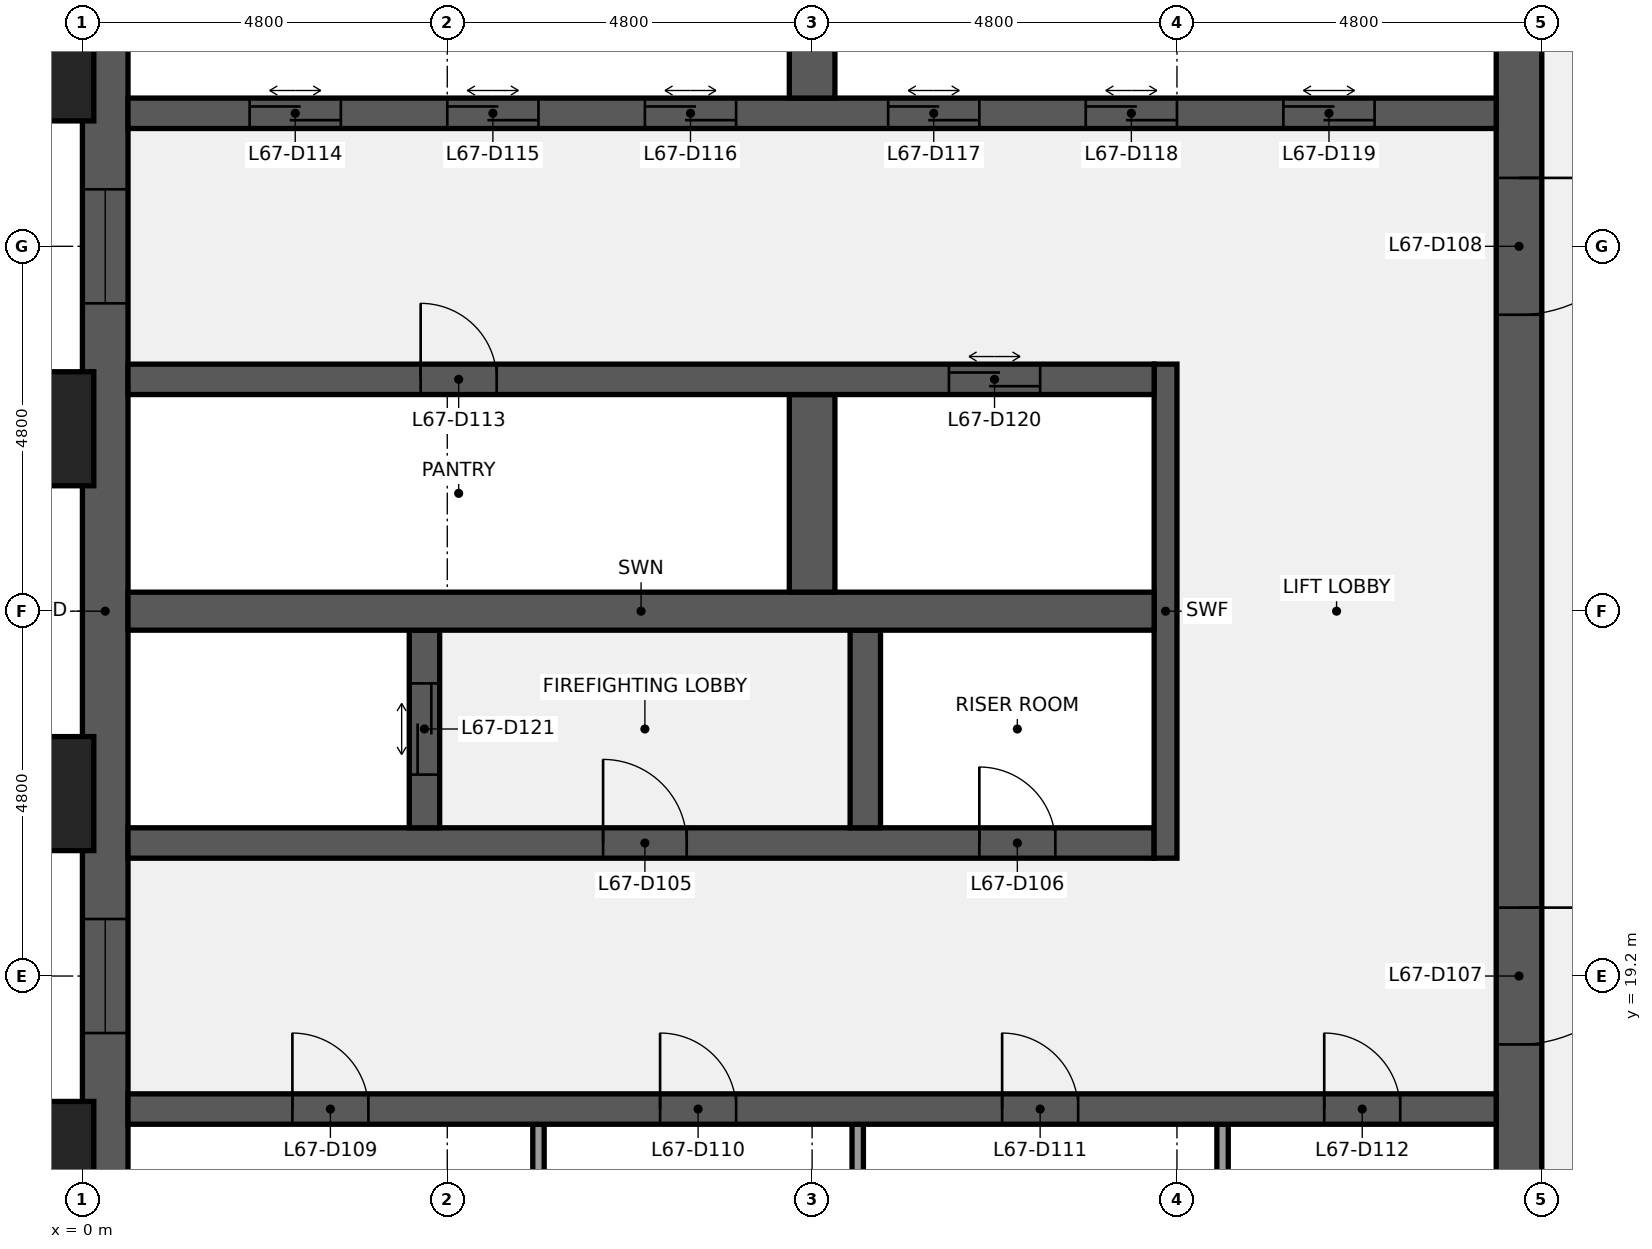
"""IFC4 building model, lengths in metres.
Left out: names, types, materials, properties, quantities, classifications, styles, units other than length and angle.
Written with IfcOpenShell. Run it as: python <this file> out.ifc"""

import sys

from ifc_helpers import new_model, si_unit, direction, frame, frame_2d, origin, origin_2d, place, context, subcontext, project, spatial, rectangle, extrude, element, fill, save


model = new_model("IFC4")
c1 = context("Model", 3, precision=1e-05, world=origin(), true_north=direction((0.0, 1.0)))
c2 = subcontext(c1, "Body", "Model", "MODEL_VIEW")
j1 = project(units=[si_unit("LENGTHUNIT", "METRE"), si_unit("PLANEANGLEUNIT", "RADIAN")], contexts=[c1])
p1 = place(None, origin())
s1 = spatial("IfcSite", under=j1, at=p1, CompositionType="ELEMENT")
p2 = place(p1, origin())
s2 = spatial("IfcBuilding", under=s1, at=p2, CompositionType="ELEMENT")
p3 = place(p2, frame((0.0, 0.0, 306.3)))
s3 = spatial("IfcBuildingStorey", under=s2, at=p3, CompositionType="ELEMENT", Elevation=306.3)
p4 = place(p3, frame((0.3, 9.6, 0.0), z_axis=(0.0, 0.0, 1.0), x_axis=(0.0, 1.0, 0.0)))
e1 = element("IfcWall", 1, at=p4, inside=s3, PredefinedType="SHEAR", context=c2, shape_type="SweptSolid", body=[
    extrude(rectangle(XDim=28.8, YDim=0.6, at=frame_2d((14.4, 0.0))), origin(), (0.0, 0.0, 1.0), 3.84),
])
p5 = place(p4, frame((8.85, 0.0, 0.9)))
e2 = element("IfcOpeningElement", 2, at=p5, cuts=e1, PredefinedType="OPENING", context=c2, shape_type="SweptSolid", body=[
    extrude(rectangle(XDim=1.5, YDim=1.5, at=frame_2d((0.75, 0.75))), frame((0.0, 0.31, 0.0), z_axis=(0.0, -1.0, 0.0), x_axis=(1.0, 0.0, 0.0)), (0.0, 0.0, 1.0), 0.62),
])
p6 = place(p4, frame((18.45, 0.0, 0.9)))
e3 = element("IfcOpeningElement", 3, at=p6, cuts=e1, PredefinedType="OPENING", context=c2, shape_type="SweptSolid", body=[
    extrude(rectangle(XDim=1.5, YDim=1.5, at=frame_2d((0.75, 0.75))), frame((0.0, 0.31, 0.0), z_axis=(0.0, -1.0, 0.0), x_axis=(1.0, 0.0, 0.0)), (0.0, 0.0, 1.0), 0.62),
])
p7 = place(p3, frame((18.9, 38.4, 0.0), z_axis=(0.0, 0.0, 1.0), x_axis=(0.0, -1.0, 0.0)))
e4 = element("IfcWall", 4, at=p7, inside=s3, PredefinedType="SHEAR", context=c2, shape_type="SweptSolid", body=[
    extrude(rectangle(XDim=28.8, YDim=0.6, at=frame_2d((14.4, 0.0))), origin(), (0.0, 0.0, 1.0), 3.84),
])
p8 = place(p7, frame((18.3, 0.0, 0.0)))
e5 = element("IfcOpeningElement", 5, at=p8, cuts=e4, PredefinedType="OPENING", context=c2, shape_type="SweptSolid", body=[
    extrude(rectangle(XDim=1.8, YDim=2.1, at=frame_2d((0.9, 1.05))), frame((0.0, 0.31, 0.0), z_axis=(0.0, -1.0, 0.0), x_axis=(1.0, 0.0, 0.0)), (0.0, 0.0, 1.0), 0.62),
])
p9 = place(p7, frame((8.7, 0.0, 0.0)))
e6 = element("IfcOpeningElement", 6, at=p9, cuts=e4, PredefinedType="OPENING", context=c2, shape_type="SweptSolid", body=[
    extrude(rectangle(XDim=1.8, YDim=2.1, at=frame_2d((0.9, 1.05))), frame((0.0, 0.31, 0.0), z_axis=(0.0, -1.0, 0.0), x_axis=(1.0, 0.0, 0.0)), (0.0, 0.0, 1.0), 0.62),
])
for number, where, z_axis, x_axis in (
    (7, (6.0, 14.65, 0.0), (0.0, 0.0, 1.0), (0.0, 1.0, 0.0)),
    (8, (10.2, 14.65, 0.0), (0.0, 0.0, 1.0), (0.0, 1.0, 0.0)),
    (9, (15.0, 14.65, 0.0), (0.0, 0.0, 1.0), (0.0, 1.0, 0.0)),
):
    element("IfcWall", number, at=place(p3, frame(where, z_axis=z_axis, x_axis=x_axis)), inside=s3, PredefinedType="PARTITIONING", context=c2, shape_type="SweptSolid", body=[
        extrude(rectangle(XDim=2.6, YDim=0.15, at=frame_2d((1.3, 0.0))), origin(), (0.0, 0.0, 1.0), 3.84),
    ])
p10 = place(p3, frame((0.6, 17.45, 0.0), z_axis=(0.0, 0.0, 1.0), x_axis=(1.0, 0.0, 0.0)))
e10 = element("IfcWall", 10, at=p10, inside=s3, PredefinedType="SHEAR", context=c2, shape_type="SweptSolid", body=[
    extrude(rectangle(XDim=18.0, YDim=0.4, at=frame_2d((9.0, 0.0))), origin(), (0.0, 0.0, 1.0), 3.84),
])
p11 = place(p10, frame((2.163, 0.0, 0.0)))
e11 = element("IfcOpeningElement", 11, at=p11, cuts=e10, PredefinedType="OPENING", context=c2, shape_type="SweptSolid", body=[
    extrude(rectangle(XDim=1.0, YDim=2.1, at=frame_2d((0.5, 1.05))), frame((0.0, 0.21, 0.0), z_axis=(0.0, -1.0, 0.0), x_axis=(1.0, 0.0, 0.0)), (0.0, 0.0, 1.0), 0.42),
])
p12 = place(p10, frame((7.0, 0.0, 0.0)))
e12 = element("IfcOpeningElement", 12, at=p12, cuts=e10, PredefinedType="OPENING", context=c2, shape_type="SweptSolid", body=[
    extrude(rectangle(XDim=1.0, YDim=2.1, at=frame_2d((0.5, 1.05))), frame((0.0, 0.21, 0.0), z_axis=(0.0, -1.0, 0.0), x_axis=(1.0, 0.0, 0.0)), (0.0, 0.0, 1.0), 0.42),
])
p13 = place(p10, frame((11.5, 0.0, 0.0)))
e13 = element("IfcOpeningElement", 13, at=p13, cuts=e10, PredefinedType="OPENING", context=c2, shape_type="SweptSolid", body=[
    extrude(rectangle(XDim=1.0, YDim=2.1, at=frame_2d((0.5, 1.05))), frame((0.0, 0.21, 0.0), z_axis=(0.0, -1.0, 0.0), x_axis=(1.0, 0.0, 0.0)), (0.0, 0.0, 1.0), 0.42),
])
p14 = place(p10, frame((15.738, 0.0, 0.0)))
e14 = element("IfcOpeningElement", 14, at=p14, cuts=e10, PredefinedType="OPENING", context=c2, shape_type="SweptSolid", body=[
    extrude(rectangle(XDim=1.0, YDim=2.1, at=frame_2d((0.5, 1.05))), frame((0.0, 0.21, 0.0), z_axis=(0.0, -1.0, 0.0), x_axis=(1.0, 0.0, 0.0)), (0.0, 0.0, 1.0), 0.42),
])
p15 = place(p3, frame((0.6, 20.95, 0.0), z_axis=(0.0, 0.0, 1.0), x_axis=(1.0, 0.0, 0.0)))
e15 = element("IfcWall", 15, at=p15, inside=s3, PredefinedType="SHEAR", context=c2, shape_type="SweptSolid", body=[
    extrude(rectangle(XDim=13.5, YDim=0.4, at=frame_2d((6.75, 0.0))), origin(), (0.0, 0.0, 1.0), 3.84),
])
p16 = place(p15, frame((6.25, 0.0, 0.0)))
e16 = element("IfcOpeningElement", 16, at=p16, cuts=e15, PredefinedType="OPENING", context=c2, shape_type="SweptSolid", body=[
    extrude(rectangle(XDim=1.1, YDim=2.1, at=frame_2d((0.55, 1.05))), frame((0.0, 0.21, 0.0), z_axis=(0.0, -1.0, 0.0), x_axis=(1.0, 0.0, 0.0)), (0.0, 0.0, 1.0), 0.42),
])
p17 = place(p15, frame((11.2, 0.0, 0.0)))
e17 = element("IfcOpeningElement", 17, at=p17, cuts=e15, PredefinedType="OPENING", context=c2, shape_type="SweptSolid", body=[
    extrude(rectangle(XDim=1.0, YDim=2.1, at=frame_2d((0.5, 1.05))), frame((0.0, 0.21, 0.0), z_axis=(0.0, -1.0, 0.0), x_axis=(1.0, 0.0, 0.0)), (0.0, 0.0, 1.0), 0.42),
])
p18 = place(p3, frame((14.25, 20.75, 0.0), z_axis=(0.0, 0.0, 1.0), x_axis=(0.0, 1.0, 0.0)))
e18 = element("IfcWall", 18, at=p18, inside=s3, PredefinedType="SHEAR", context=c2, shape_type="SweptSolid", body=[
    extrude(rectangle(XDim=6.5, YDim=0.3, at=frame_2d((3.25, 0.0))), origin(), (0.0, 0.0, 1.0), 3.84),
])
p19 = place(p3, frame((4.5, 21.15, 0.0), z_axis=(0.0, 0.0, 1.0), x_axis=(0.0, 1.0, 0.0)))
e19 = element("IfcWall", 19, at=p19, inside=s3, PredefinedType="SHEAR", context=c2, shape_type="SweptSolid", body=[
    extrude(rectangle(XDim=2.6, YDim=0.4, at=frame_2d((1.3, 0.0))), origin(), (0.0, 0.0, 1.0), 3.84),
])
p20 = place(p19, frame((0.7, 0.0, 0.0)))
e20 = element("IfcOpeningElement", 20, at=p20, cuts=e19, PredefinedType="OPENING", context=c2, shape_type="SweptSolid", body=[
    extrude(rectangle(XDim=1.2, YDim=2.1, at=frame_2d((0.6, 1.05))), frame((0.0, 0.21, 0.0), z_axis=(0.0, -1.0, 0.0), x_axis=(1.0, 0.0, 0.0)), (0.0, 0.0, 1.0), 0.42),
])
p21 = place(p3, frame((10.3, 21.15, 0.0), z_axis=(0.0, 0.0, 1.0), x_axis=(0.0, 1.0, 0.0)))
e21 = element("IfcWall", 21, at=p21, inside=s3, PredefinedType="SHEAR", context=c2, shape_type="SweptSolid", body=[
    extrude(rectangle(XDim=2.6, YDim=0.4, at=frame_2d((1.3, 0.0))), origin(), (0.0, 0.0, 1.0), 3.84),
])
p22 = place(p3, frame((0.6, 24.0, 0.0), z_axis=(0.0, 0.0, 1.0), x_axis=(1.0, 0.0, 0.0)))
e22 = element("IfcWall", 22, at=p22, inside=s3, PredefinedType="SHEAR", context=c2, shape_type="SweptSolid", body=[
    extrude(rectangle(XDim=13.5, YDim=0.5, at=frame_2d((6.75, 0.0))), origin(), (0.0, 0.0, 1.0), 3.84),
])
p23 = place(p3, frame((9.6, 24.25, 0.0), z_axis=(0.0, 0.0, 1.0), x_axis=(0.0, 1.0, 0.0)))
e23 = element("IfcWall", 23, at=p23, inside=s3, PredefinedType="SHEAR", context=c2, shape_type="SweptSolid", body=[
    extrude(rectangle(XDim=2.6, YDim=0.6, at=frame_2d((1.3, 0.0))), origin(), (0.0, 0.0, 1.0), 3.84),
])
p24 = place(p3, frame((0.6, 27.05, 0.0), z_axis=(0.0, 0.0, 1.0), x_axis=(1.0, 0.0, 0.0)))
e24 = element("IfcWall", 24, at=p24, inside=s3, PredefinedType="SHEAR", context=c2, shape_type="SweptSolid", body=[
    extrude(rectangle(XDim=13.5, YDim=0.4, at=frame_2d((6.75, 0.0))), origin(), (0.0, 0.0, 1.0), 3.84),
])
p25 = place(p24, frame((3.85, 0.0, 0.0)))
e25 = element("IfcOpeningElement", 25, at=p25, cuts=e24, PredefinedType="OPENING", context=c2, shape_type="SweptSolid", body=[
    extrude(rectangle(XDim=1.0, YDim=2.1, at=frame_2d((0.5, 1.05))), frame((0.0, 0.21, 0.0), z_axis=(0.0, -1.0, 0.0), x_axis=(1.0, 0.0, 0.0)), (0.0, 0.0, 1.0), 0.42),
])
p26 = place(p24, frame((10.8, 0.0, 0.0)))
e26 = element("IfcOpeningElement", 26, at=p26, cuts=e24, PredefinedType="OPENING", context=c2, shape_type="SweptSolid", body=[
    extrude(rectangle(XDim=1.2, YDim=2.1, at=frame_2d((0.6, 1.05))), frame((0.0, 0.21, 0.0), z_axis=(0.0, -1.0, 0.0), x_axis=(1.0, 0.0, 0.0)), (0.0, 0.0, 1.0), 0.42),
])
p27 = place(p3, frame((0.6, 30.55, 0.0), z_axis=(0.0, 0.0, 1.0), x_axis=(1.0, 0.0, 0.0)))
e27 = element("IfcWall", 27, at=p27, inside=s3, PredefinedType="SHEAR", context=c2, shape_type="SweptSolid", body=[
    extrude(rectangle(XDim=18.0, YDim=0.4, at=frame_2d((9.0, 0.0))), origin(), (0.0, 0.0, 1.0), 3.84),
])
p28 = place(p27, frame((1.6, 0.0, 0.0)))
e28 = element("IfcOpeningElement", 28, at=p28, cuts=e27, PredefinedType="OPENING", context=c2, shape_type="SweptSolid", body=[
    extrude(rectangle(XDim=1.2, YDim=2.1, at=frame_2d((0.6, 1.05))), frame((0.0, 0.21, 0.0), z_axis=(0.0, -1.0, 0.0), x_axis=(1.0, 0.0, 0.0)), (0.0, 0.0, 1.0), 0.42),
])
p29 = place(p27, frame((4.2, 0.0, 0.0)))
e29 = element("IfcOpeningElement", 29, at=p29, cuts=e27, PredefinedType="OPENING", context=c2, shape_type="SweptSolid", body=[
    extrude(rectangle(XDim=1.2, YDim=2.1, at=frame_2d((0.6, 1.05))), frame((0.0, 0.21, 0.0), z_axis=(0.0, -1.0, 0.0), x_axis=(1.0, 0.0, 0.0)), (0.0, 0.0, 1.0), 0.42),
])
p30 = place(p27, frame((6.8, 0.0, 0.0)))
e30 = element("IfcOpeningElement", 30, at=p30, cuts=e27, PredefinedType="OPENING", context=c2, shape_type="SweptSolid", body=[
    extrude(rectangle(XDim=1.2, YDim=2.1, at=frame_2d((0.6, 1.05))), frame((0.0, 0.21, 0.0), z_axis=(0.0, -1.0, 0.0), x_axis=(1.0, 0.0, 0.0)), (0.0, 0.0, 1.0), 0.42),
])
p31 = place(p27, frame((10.0, 0.0, 0.0)))
e31 = element("IfcOpeningElement", 31, at=p31, cuts=e27, PredefinedType="OPENING", context=c2, shape_type="SweptSolid", body=[
    extrude(rectangle(XDim=1.2, YDim=2.1, at=frame_2d((0.6, 1.05))), frame((0.0, 0.21, 0.0), z_axis=(0.0, -1.0, 0.0), x_axis=(1.0, 0.0, 0.0)), (0.0, 0.0, 1.0), 0.42),
])
p32 = place(p27, frame((12.6, 0.0, 0.0)))
e32 = element("IfcOpeningElement", 32, at=p32, cuts=e27, PredefinedType="OPENING", context=c2, shape_type="SweptSolid", body=[
    extrude(rectangle(XDim=1.2, YDim=2.1, at=frame_2d((0.6, 1.05))), frame((0.0, 0.21, 0.0), z_axis=(0.0, -1.0, 0.0), x_axis=(1.0, 0.0, 0.0)), (0.0, 0.0, 1.0), 0.42),
])
p33 = place(p27, frame((15.2, 0.0, 0.0)))
e33 = element("IfcOpeningElement", 33, at=p33, cuts=e27, PredefinedType="OPENING", context=c2, shape_type="SweptSolid", body=[
    extrude(rectangle(XDim=1.2, YDim=2.1, at=frame_2d((0.6, 1.05))), frame((0.0, 0.21, 0.0), z_axis=(0.0, -1.0, 0.0), x_axis=(1.0, 0.0, 0.0)), (0.0, 0.0, 1.0), 0.42),
])
p34 = place(p3, frame((9.6, 30.75, 0.0), z_axis=(0.0, 0.0, 1.0), x_axis=(0.0, 1.0, 0.0)))
e34 = element("IfcWall", 34, at=p34, inside=s3, PredefinedType="SHEAR", context=c2, shape_type="SweptSolid", body=[
    extrude(rectangle(XDim=2.6, YDim=0.6, at=frame_2d((1.3, 0.0))), origin(), (0.0, 0.0, 1.0), 3.84),
])
for number, where, z_axis, x_axis in (
    (35, (-0.75, 16.8, 0.0), (0.0, 0.0, 1.0), (0.0, 1.0, 0.0)),
    (36, (-0.75, 21.6, 0.0), (0.0, 0.0, 1.0), (0.0, 1.0, 0.0)),
    (37, (-0.75, 26.4, 0.0), (0.0, 0.0, 1.0), (0.0, 1.0, 0.0)),
    (38, (-0.75, 31.2, 0.0), (0.0, 0.0, 1.0), (0.0, 1.0, 0.0)),
):
    element("IfcColumn", number, at=place(p3, frame(where, z_axis=z_axis, x_axis=x_axis)), inside=s3, PredefinedType="PILASTER", context=c2, shape_type="SweptSolid", body=[
        extrude(rectangle(XDim=1.8, YDim=1.5, at=origin_2d()), origin(), (0.0, 0.0, 1.0), 4.0),
    ])
p35 = place(p16, origin())
e39 = element("IfcDoor", 39, at=p35, inside=s3, OperationType="SINGLE_SWING_LEFT", PredefinedType="DOOR", context=c2, shape_type="SweptSolid", body=[
    extrude(rectangle(XDim=1.1, YDim=2.1, at=frame_2d((0.55, 1.05))), frame((0.0, 0.025, 0.0), z_axis=(0.0, -1.0, 0.0), x_axis=(1.0, 0.0, 0.0)), (0.0, 0.0, 1.0), 0.05),
])
fill(e16, e39)
p36 = place(p17, origin())
e40 = element("IfcDoor", 40, at=p36, inside=s3, OperationType="SINGLE_SWING_LEFT", PredefinedType="DOOR", context=c2, shape_type="SweptSolid", body=[
    extrude(rectangle(XDim=1.0, YDim=2.1, at=frame_2d((0.5, 1.05))), frame((0.0, 0.025, 0.0), z_axis=(0.0, -1.0, 0.0), x_axis=(1.0, 0.0, 0.0)), (0.0, 0.0, 1.0), 0.05),
])
fill(e17, e40)
p37 = place(p8, origin())
e41 = element("IfcDoor", 41, at=p37, inside=s3, OperationType="DOUBLE_DOOR_SINGLE_SWING", PredefinedType="DOOR", context=c2, shape_type="SweptSolid", body=[
    extrude(rectangle(XDim=1.8, YDim=2.1, at=frame_2d((0.9, 1.05))), frame((0.0, 0.025, 0.0), z_axis=(0.0, -1.0, 0.0), x_axis=(1.0, 0.0, 0.0)), (0.0, 0.0, 1.0), 0.05),
])
fill(e5, e41)
p38 = place(p9, origin())
e42 = element("IfcDoor", 42, at=p38, inside=s3, OperationType="DOUBLE_DOOR_SINGLE_SWING", PredefinedType="DOOR", context=c2, shape_type="SweptSolid", body=[
    extrude(rectangle(XDim=1.8, YDim=2.1, at=frame_2d((0.9, 1.05))), frame((0.0, 0.025, 0.0), z_axis=(0.0, -1.0, 0.0), x_axis=(1.0, 0.0, 0.0)), (0.0, 0.0, 1.0), 0.05),
])
fill(e6, e42)
p39 = place(p11, origin())
e43 = element("IfcDoor", 43, at=p39, inside=s3, OperationType="SINGLE_SWING_LEFT", PredefinedType="DOOR", context=c2, shape_type="SweptSolid", body=[
    extrude(rectangle(XDim=1.0, YDim=2.1, at=frame_2d((0.5, 1.05))), frame((0.0, 0.025, 0.0), z_axis=(0.0, -1.0, 0.0), x_axis=(1.0, 0.0, 0.0)), (0.0, 0.0, 1.0), 0.05),
])
fill(e11, e43)
p40 = place(p12, origin())
e44 = element("IfcDoor", 44, at=p40, inside=s3, OperationType="SINGLE_SWING_LEFT", PredefinedType="DOOR", context=c2, shape_type="SweptSolid", body=[
    extrude(rectangle(XDim=1.0, YDim=2.1, at=frame_2d((0.5, 1.05))), frame((0.0, 0.025, 0.0), z_axis=(0.0, -1.0, 0.0), x_axis=(1.0, 0.0, 0.0)), (0.0, 0.0, 1.0), 0.05),
])
fill(e12, e44)
p41 = place(p13, origin())
e45 = element("IfcDoor", 45, at=p41, inside=s3, OperationType="SINGLE_SWING_LEFT", PredefinedType="DOOR", context=c2, shape_type="SweptSolid", body=[
    extrude(rectangle(XDim=1.0, YDim=2.1, at=frame_2d((0.5, 1.05))), frame((0.0, 0.025, 0.0), z_axis=(0.0, -1.0, 0.0), x_axis=(1.0, 0.0, 0.0)), (0.0, 0.0, 1.0), 0.05),
])
fill(e13, e45)
p42 = place(p14, origin())
e46 = element("IfcDoor", 46, at=p42, inside=s3, OperationType="SINGLE_SWING_LEFT", PredefinedType="DOOR", context=c2, shape_type="SweptSolid", body=[
    extrude(rectangle(XDim=1.0, YDim=2.1, at=frame_2d((0.5, 1.05))), frame((0.0, 0.025, 0.0), z_axis=(0.0, -1.0, 0.0), x_axis=(1.0, 0.0, 0.0)), (0.0, 0.0, 1.0), 0.05),
])
fill(e14, e46)
p43 = place(p25, origin())
e47 = element("IfcDoor", 47, at=p43, inside=s3, OperationType="SINGLE_SWING_LEFT", PredefinedType="DOOR", context=c2, shape_type="SweptSolid", body=[
    extrude(rectangle(XDim=1.0, YDim=2.1, at=frame_2d((0.5, 1.05))), frame((0.0, 0.025, 0.0), z_axis=(0.0, -1.0, 0.0), x_axis=(1.0, 0.0, 0.0)), (0.0, 0.0, 1.0), 0.05),
])
fill(e25, e47)
p44 = place(p28, origin())
e48 = element("IfcDoor", 48, at=p44, inside=s3, OperationType="DOUBLE_DOOR_SLIDING", PredefinedType="DOOR", context=c2, shape_type="SweptSolid", body=[
    extrude(rectangle(XDim=1.2, YDim=2.1, at=frame_2d((0.6, 1.05))), frame((0.0, 0.025, 0.0), z_axis=(0.0, -1.0, 0.0), x_axis=(1.0, 0.0, 0.0)), (0.0, 0.0, 1.0), 0.05),
])
fill(e28, e48)
p45 = place(p29, origin())
e49 = element("IfcDoor", 49, at=p45, inside=s3, OperationType="DOUBLE_DOOR_SLIDING", PredefinedType="DOOR", context=c2, shape_type="SweptSolid", body=[
    extrude(rectangle(XDim=1.2, YDim=2.1, at=frame_2d((0.6, 1.05))), frame((0.0, 0.025, 0.0), z_axis=(0.0, -1.0, 0.0), x_axis=(1.0, 0.0, 0.0)), (0.0, 0.0, 1.0), 0.05),
])
fill(e29, e49)
p46 = place(p30, origin())
e50 = element("IfcDoor", 50, at=p46, inside=s3, OperationType="DOUBLE_DOOR_SLIDING", PredefinedType="DOOR", context=c2, shape_type="SweptSolid", body=[
    extrude(rectangle(XDim=1.2, YDim=2.1, at=frame_2d((0.6, 1.05))), frame((0.0, 0.025, 0.0), z_axis=(0.0, -1.0, 0.0), x_axis=(1.0, 0.0, 0.0)), (0.0, 0.0, 1.0), 0.05),
])
fill(e30, e50)
p47 = place(p31, origin())
e51 = element("IfcDoor", 51, at=p47, inside=s3, OperationType="DOUBLE_DOOR_SLIDING", PredefinedType="DOOR", context=c2, shape_type="SweptSolid", body=[
    extrude(rectangle(XDim=1.2, YDim=2.1, at=frame_2d((0.6, 1.05))), frame((0.0, 0.025, 0.0), z_axis=(0.0, -1.0, 0.0), x_axis=(1.0, 0.0, 0.0)), (0.0, 0.0, 1.0), 0.05),
])
fill(e31, e51)
p48 = place(p32, origin())
e52 = element("IfcDoor", 52, at=p48, inside=s3, OperationType="DOUBLE_DOOR_SLIDING", PredefinedType="DOOR", context=c2, shape_type="SweptSolid", body=[
    extrude(rectangle(XDim=1.2, YDim=2.1, at=frame_2d((0.6, 1.05))), frame((0.0, 0.025, 0.0), z_axis=(0.0, -1.0, 0.0), x_axis=(1.0, 0.0, 0.0)), (0.0, 0.0, 1.0), 0.05),
])
fill(e32, e52)
p49 = place(p33, origin())
e53 = element("IfcDoor", 53, at=p49, inside=s3, OperationType="DOUBLE_DOOR_SLIDING", PredefinedType="DOOR", context=c2, shape_type="SweptSolid", body=[
    extrude(rectangle(XDim=1.2, YDim=2.1, at=frame_2d((0.6, 1.05))), frame((0.0, 0.025, 0.0), z_axis=(0.0, -1.0, 0.0), x_axis=(1.0, 0.0, 0.0)), (0.0, 0.0, 1.0), 0.05),
])
fill(e33, e53)
p50 = place(p26, origin())
e54 = element("IfcDoor", 54, at=p50, inside=s3, OperationType="DOUBLE_DOOR_SLIDING", PredefinedType="DOOR", context=c2, shape_type="SweptSolid", body=[
    extrude(rectangle(XDim=1.2, YDim=2.1, at=frame_2d((0.6, 1.05))), frame((0.0, 0.025, 0.0), z_axis=(0.0, -1.0, 0.0), x_axis=(1.0, 0.0, 0.0)), (0.0, 0.0, 1.0), 0.05),
])
fill(e26, e54)
p51 = place(p20, origin())
e55 = element("IfcDoor", 55, at=p51, inside=s3, OperationType="DOUBLE_DOOR_SLIDING", PredefinedType="DOOR", context=c2, shape_type="SweptSolid", body=[
    extrude(rectangle(XDim=1.2, YDim=2.1, at=frame_2d((0.6, 1.05))), frame((0.0, 0.025, 0.0), z_axis=(0.0, -1.0, 0.0), x_axis=(1.0, 0.0, 0.0)), (0.0, 0.0, 1.0), 0.05),
])
fill(e20, e55)
p52 = place(p5, origin())
e56 = element("IfcWindow", 56, at=p52, inside=s3, PartitioningType="SINGLE_PANEL", PredefinedType="WINDOW", context=c2, shape_type="SweptSolid", body=[
    extrude(rectangle(XDim=1.5, YDim=1.5, at=frame_2d((0.75, 0.75))), frame((0.0, 0.03, 0.0), z_axis=(0.0, -1.0, 0.0), x_axis=(1.0, 0.0, 0.0)), (0.0, 0.0, 1.0), 0.06),
])
fill(e2, e56)
p53 = place(p6, origin())
e57 = element("IfcWindow", 57, at=p53, inside=s3, PartitioningType="SINGLE_PANEL", PredefinedType="WINDOW", context=c2, shape_type="SweptSolid", body=[
    extrude(rectangle(XDim=1.5, YDim=1.5, at=frame_2d((0.75, 0.75))), frame((0.0, 0.03, 0.0), z_axis=(0.0, -1.0, 0.0), x_axis=(1.0, 0.0, 0.0)), (0.0, 0.0, 1.0), 0.06),
])
fill(e3, e57)
save(model, sys.argv[1])
